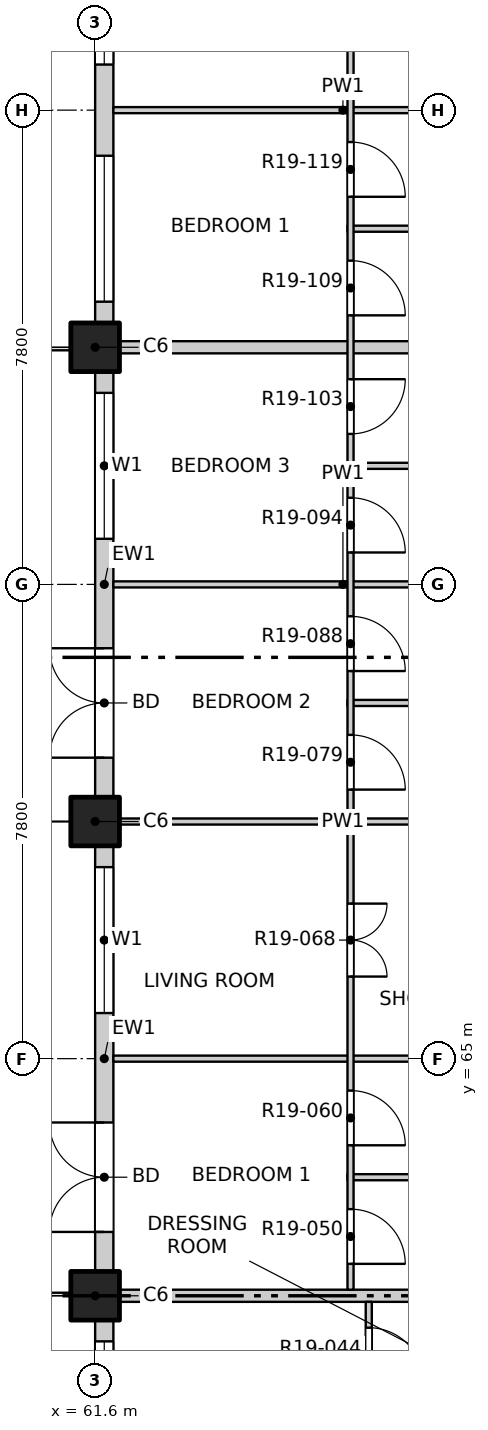
"""IFC4 building model, lengths in metres.
Left out: names, types, materials, properties, quantities, classifications, styles, units other than length and angle.
Written with IfcOpenShell. Run it as: python <this file> out.ifc"""

import sys

from ifc_helpers import new_model, si_unit, direction, frame, frame_2d, origin, origin_2d, place, context, subcontext, project, spatial, rectangle, extrude, element, fill, save


model = new_model("IFC4")
c1 = context("Model", 3, precision=1e-05, world=origin(), true_north=direction((0.0, 1.0)))
c2 = subcontext(c1, "Body", "Model", "MODEL_VIEW")
j1 = project(units=[si_unit("LENGTHUNIT", "METRE"), si_unit("PLANEANGLEUNIT", "RADIAN")], contexts=[c1])
p1 = place(None, origin())
s1 = spatial("IfcSite", under=j1, at=p1, CompositionType="ELEMENT")
p2 = place(p1, origin())
s2 = spatial("IfcBuilding", under=s1, at=p2, CompositionType="ELEMENT")
p3 = place(p2, frame((0.0, 0.0, 197.3)))
s3 = spatial("IfcBuildingStorey", under=s2, at=p3, CompositionType="ELEMENT", Elevation=197.3)
for number, where, z_axis, x_axis in (
    (1, (61.6, 61.1, -0.3), (0.0, 0.0, 1.0), (1.0, 0.0, 0.0)),
    (2, (61.6, 68.9, -0.3), (0.0, 0.0, 1.0), (1.0, 0.0, 0.0)),
    (3, (61.6, 76.7, -0.3), (0.0, 0.0, 1.0), (1.0, 0.0, 0.0)),
):
    element("IfcColumn", number, at=place(p3, frame(where, z_axis=z_axis, x_axis=x_axis)), inside=s3, PredefinedType="COLUMN", context=c2, shape_type="SweptSolid", body=[
        extrude(rectangle(XDim=0.8, YDim=0.8, at=origin_2d()), origin(), (0.0, 0.0, 1.0), 3.45),
    ])
p4 = place(p3, frame((61.75, 53.7, 0.0), z_axis=(0.0, 0.0, 1.0), x_axis=(0.0, 1.0, 0.0)))
e4 = element("IfcWall", 4, at=p4, inside=s3, PredefinedType="SOLIDWALL", context=c2, shape_type="SweptSolid", body=[
    extrude(rectangle(XDim=7.0, YDim=0.3, at=frame_2d((3.5, 0.0))), origin(), (0.0, 0.0, 1.0), 2.7),
])
p5 = place(p4, frame((0.35, 0.0, 0.9)))
e5 = element("IfcOpeningElement", 5, at=p5, cuts=e4, PredefinedType="OPENING", context=c2, shape_type="SweptSolid", body=[
    extrude(rectangle(XDim=2.4, YDim=1.8, at=frame_2d((1.2, 0.9))), frame((0.0, 0.16, 0.0), z_axis=(0.0, -1.0, 0.0), x_axis=(1.0, 0.0, 0.0)), (0.0, 0.0, 1.0), 0.32),
])
p6 = place(p4, frame((4.25, 0.0, 0.9)))
e6 = element("IfcOpeningElement", 6, at=p6, cuts=e4, PredefinedType="OPENING", context=c2, shape_type="SweptSolid", body=[
    extrude(rectangle(XDim=2.4, YDim=1.8, at=frame_2d((1.2, 0.9))), frame((0.0, 0.16, 0.0), z_axis=(0.0, -1.0, 0.0), x_axis=(1.0, 0.0, 0.0)), (0.0, 0.0, 1.0), 0.32),
])
p7 = place(p3, frame((61.75, 61.5, 0.0), z_axis=(0.0, 0.0, 1.0), x_axis=(0.0, 1.0, 0.0)))
e7 = element("IfcWall", 7, at=p7, inside=s3, PredefinedType="SOLIDWALL", context=c2, shape_type="SweptSolid", body=[
    extrude(rectangle(XDim=7.0, YDim=0.3, at=frame_2d((3.5, 0.0))), origin(), (0.0, 0.0, 1.0), 2.7),
])
p8 = place(p7, frame((0.65, 0.0, 0.0)))
e8 = element("IfcOpeningElement", 8, at=p8, cuts=e7, PredefinedType="OPENING", context=c2, shape_type="SweptSolid", body=[
    extrude(rectangle(XDim=1.8, YDim=2.4, at=frame_2d((0.9, 1.2))), frame((0.0, 0.16, 0.0), z_axis=(0.0, -1.0, 0.0), x_axis=(1.0, 0.0, 0.0)), (0.0, 0.0, 1.0), 0.32),
])
p9 = place(p7, frame((4.25, 0.0, 0.9)))
e9 = element("IfcOpeningElement", 9, at=p9, cuts=e7, PredefinedType="OPENING", context=c2, shape_type="SweptSolid", body=[
    extrude(rectangle(XDim=2.4, YDim=1.8, at=frame_2d((1.2, 0.9))), frame((0.0, 0.16, 0.0), z_axis=(0.0, -1.0, 0.0), x_axis=(1.0, 0.0, 0.0)), (0.0, 0.0, 1.0), 0.32),
])
p10 = place(p3, frame((61.75, 69.3, 0.0), z_axis=(0.0, 0.0, 1.0), x_axis=(0.0, 1.0, 0.0)))
e10 = element("IfcWall", 10, at=p10, inside=s3, PredefinedType="SOLIDWALL", context=c2, shape_type="SweptSolid", body=[
    extrude(rectangle(XDim=7.0, YDim=0.3, at=frame_2d((3.5, 0.0))), origin(), (0.0, 0.0, 1.0), 2.7),
])
p11 = place(p10, frame((0.65, 0.0, 0.0)))
e11 = element("IfcOpeningElement", 11, at=p11, cuts=e10, PredefinedType="OPENING", context=c2, shape_type="SweptSolid", body=[
    extrude(rectangle(XDim=1.8, YDim=2.4, at=frame_2d((0.9, 1.2))), frame((0.0, 0.16, 0.0), z_axis=(0.0, -1.0, 0.0), x_axis=(1.0, 0.0, 0.0)), (0.0, 0.0, 1.0), 0.32),
])
p12 = place(p10, frame((4.25, 0.0, 0.9)))
e12 = element("IfcOpeningElement", 12, at=p12, cuts=e10, PredefinedType="OPENING", context=c2, shape_type="SweptSolid", body=[
    extrude(rectangle(XDim=2.4, YDim=1.8, at=frame_2d((1.2, 0.9))), frame((0.0, 0.16, 0.0), z_axis=(0.0, -1.0, 0.0), x_axis=(1.0, 0.0, 0.0)), (0.0, 0.0, 1.0), 0.32),
])
p13 = place(p3, frame((61.75, 77.1, 0.0), z_axis=(0.0, 0.0, 1.0), x_axis=(0.0, 1.0, 0.0)))
e13 = element("IfcWall", 13, at=p13, inside=s3, PredefinedType="SOLIDWALL", context=c2, shape_type="SweptSolid", body=[
    extrude(rectangle(XDim=7.4, YDim=0.3, at=frame_2d((3.7, 0.0))), origin(), (0.0, 0.0, 1.0), 2.7),
])
p14 = place(p13, frame((0.35, 0.0, 0.9)))
e14 = element("IfcOpeningElement", 14, at=p14, cuts=e13, PredefinedType="OPENING", context=c2, shape_type="SweptSolid", body=[
    extrude(rectangle(XDim=2.4, YDim=1.8, at=frame_2d((1.2, 0.9))), frame((0.0, 0.16, 0.0), z_axis=(0.0, -1.0, 0.0), x_axis=(1.0, 0.0, 0.0)), (0.0, 0.0, 1.0), 0.32),
])
p15 = place(p13, frame((4.25, 0.0, 0.9)))
e15 = element("IfcOpeningElement", 15, at=p15, cuts=e13, PredefinedType="OPENING", context=c2, shape_type="SweptSolid", body=[
    extrude(rectangle(XDim=2.4, YDim=1.8, at=frame_2d((1.2, 0.9))), frame((0.0, 0.16, 0.0), z_axis=(0.0, -1.0, 0.0), x_axis=(1.0, 0.0, 0.0)), (0.0, 0.0, 1.0), 0.32),
])
p16 = place(p3, frame((61.9, 61.1, 0.0), z_axis=(0.0, 0.0, 1.0), x_axis=(1.0, 0.0, 0.0)))
e16 = element("IfcWall", 16, at=p16, inside=s3, PredefinedType="PARTITIONING", context=c2, shape_type="SweptSolid", body=[
    extrude(rectangle(XDim=11.5, YDim=0.2, at=frame_2d((5.75, 0.0))), origin(), (0.0, 0.0, 1.0), 2.55),
])
p17 = place(p3, frame((65.75, 63.05, 0.0), z_axis=(0.0, 0.0, 1.0), x_axis=(1.0, 0.0, 0.0)))
e17 = element("IfcWall", 17, at=p17, inside=s3, PredefinedType="PARTITIONING", context=c2, shape_type="SweptSolid", body=[
    extrude(rectangle(XDim=3.7, YDim=0.1, at=frame_2d((1.85, 0.0))), origin(), (0.0, 0.0, 1.0), 3.15),
])
p18 = place(p3, frame((61.9, 65.0, 0.0), z_axis=(0.0, 0.0, 1.0), x_axis=(1.0, 0.0, 0.0)))
e18 = element("IfcWall", 18, at=p18, inside=s3, PredefinedType="PARTITIONING", context=c2, shape_type="SweptSolid", body=[
    extrude(rectangle(XDim=7.55, YDim=0.1, at=frame_2d((3.775, 0.0))), origin(), (0.0, 0.0, 1.0), 3.15),
])
p19 = place(p3, frame((61.9, 68.9, 0.0), z_axis=(0.0, 0.0, 1.0), x_axis=(1.0, 0.0, 0.0)))
e19 = element("IfcWall", 19, at=p19, inside=s3, PredefinedType="PARTITIONING", context=c2, shape_type="SweptSolid", body=[
    extrude(rectangle(XDim=7.55, YDim=0.1, at=frame_2d((3.775, 0.0))), origin(), (0.0, 0.0, 1.0), 2.55),
])
p20 = place(p3, frame((65.75, 70.85, 0.0), z_axis=(0.0, 0.0, 1.0), x_axis=(1.0, 0.0, 0.0)))
e20 = element("IfcWall", 20, at=p20, inside=s3, PredefinedType="PARTITIONING", context=c2, shape_type="SweptSolid", body=[
    extrude(rectangle(XDim=3.7, YDim=0.1, at=frame_2d((1.85, 0.0))), origin(), (0.0, 0.0, 1.0), 3.15),
])
p21 = place(p3, frame((61.9, 72.8, 0.0), z_axis=(0.0, 0.0, 1.0), x_axis=(1.0, 0.0, 0.0)))
e21 = element("IfcWall", 21, at=p21, inside=s3, PredefinedType="PARTITIONING", context=c2, shape_type="SweptSolid", body=[
    extrude(rectangle(XDim=7.55, YDim=0.1, at=frame_2d((3.775, 0.0))), origin(), (0.0, 0.0, 1.0), 3.15),
])
p22 = place(p3, frame((65.75, 74.75, 0.0), z_axis=(0.0, 0.0, 1.0), x_axis=(1.0, 0.0, 0.0)))
e22 = element("IfcWall", 22, at=p22, inside=s3, PredefinedType="PARTITIONING", context=c2, shape_type="SweptSolid", body=[
    extrude(rectangle(XDim=3.7, YDim=0.1, at=frame_2d((1.85, 0.0))), origin(), (0.0, 0.0, 1.0), 3.15),
])
p23 = place(p3, frame((61.9, 76.7, 0.0), z_axis=(0.0, 0.0, 1.0), x_axis=(1.0, 0.0, 0.0)))
e23 = element("IfcWall", 23, at=p23, inside=s3, PredefinedType="PARTITIONING", context=c2, shape_type="SweptSolid", body=[
    extrude(rectangle(XDim=11.5, YDim=0.2, at=frame_2d((5.75, 0.0))), origin(), (0.0, 0.0, 1.0), 2.55),
])
p24 = place(p3, frame((65.75, 78.65, 0.0), z_axis=(0.0, 0.0, 1.0), x_axis=(1.0, 0.0, 0.0)))
e24 = element("IfcWall", 24, at=p24, inside=s3, PredefinedType="PARTITIONING", context=c2, shape_type="SweptSolid", body=[
    extrude(rectangle(XDim=3.7, YDim=0.1, at=frame_2d((1.85, 0.0))), origin(), (0.0, 0.0, 1.0), 3.15),
])
p25 = place(p3, frame((61.9, 80.6, 0.0), z_axis=(0.0, 0.0, 1.0), x_axis=(1.0, 0.0, 0.0)))
e25 = element("IfcWall", 25, at=p25, inside=s3, PredefinedType="PARTITIONING", context=c2, shape_type="SweptSolid", body=[
    extrude(rectangle(XDim=7.55, YDim=0.1, at=frame_2d((3.775, 0.0))), origin(), (0.0, 0.0, 1.0), 3.15),
])
p26 = place(p3, frame((65.8, 61.2, 0.0), z_axis=(0.0, 0.0, 1.0), x_axis=(0.0, 1.0, 0.0)))
e26 = element("IfcWall", 26, at=p26, inside=s3, PredefinedType="PARTITIONING", context=c2, shape_type="SweptSolid", body=[
    extrude(rectangle(XDim=26.9, YDim=0.1, at=frame_2d((13.45, 0.0))), origin(), (0.0, 0.0, 1.0), 3.15),
])
p27 = place(p26, frame((0.425, 0.0, 0.0)))
e27 = element("IfcOpeningElement", 27, at=p27, cuts=e26, PredefinedType="OPENING", context=c2, shape_type="SweptSolid", body=[
    extrude(rectangle(XDim=0.9, YDim=2.1, at=frame_2d((0.45, 1.05))), frame((0.0, 0.06, 0.0), z_axis=(0.0, -1.0, 0.0), x_axis=(1.0, 0.0, 0.0)), (0.0, 0.0, 1.0), 0.12),
])
p28 = place(p26, frame((2.375, 0.0, 0.0)))
e28 = element("IfcOpeningElement", 28, at=p28, cuts=e26, PredefinedType="OPENING", context=c2, shape_type="SweptSolid", body=[
    extrude(rectangle(XDim=0.9, YDim=2.1, at=frame_2d((0.45, 1.05))), frame((0.0, 0.06, 0.0), z_axis=(0.0, -1.0, 0.0), x_axis=(1.0, 0.0, 0.0)), (0.0, 0.0, 1.0), 0.12),
])
p29 = place(p26, frame((5.15, 0.0, 0.0)))
e29 = element("IfcOpeningElement", 29, at=p29, cuts=e26, PredefinedType="OPENING", context=c2, shape_type="SweptSolid", body=[
    extrude(rectangle(XDim=1.2, YDim=2.1, at=frame_2d((0.6, 1.05))), frame((0.0, 0.06, 0.0), z_axis=(0.0, -1.0, 0.0), x_axis=(1.0, 0.0, 0.0)), (0.0, 0.0, 1.0), 0.12),
])
p30 = place(p26, frame((8.225, 0.0, 0.0)))
e30 = element("IfcOpeningElement", 30, at=p30, cuts=e26, PredefinedType="OPENING", context=c2, shape_type="SweptSolid", body=[
    extrude(rectangle(XDim=0.9, YDim=2.1, at=frame_2d((0.45, 1.05))), frame((0.0, 0.06, 0.0), z_axis=(0.0, -1.0, 0.0), x_axis=(1.0, 0.0, 0.0)), (0.0, 0.0, 1.0), 0.12),
])
p31 = place(p26, frame((10.175, 0.0, 0.0)))
e31 = element("IfcOpeningElement", 31, at=p31, cuts=e26, PredefinedType="OPENING", context=c2, shape_type="SweptSolid", body=[
    extrude(rectangle(XDim=0.9, YDim=2.1, at=frame_2d((0.45, 1.05))), frame((0.0, 0.06, 0.0), z_axis=(0.0, -1.0, 0.0), x_axis=(1.0, 0.0, 0.0)), (0.0, 0.0, 1.0), 0.12),
])
p32 = place(p26, frame((12.125, 0.0, 0.0)))
e32 = element("IfcOpeningElement", 32, at=p32, cuts=e26, PredefinedType="OPENING", context=c2, shape_type="SweptSolid", body=[
    extrude(rectangle(XDim=0.9, YDim=2.1, at=frame_2d((0.45, 1.05))), frame((0.0, 0.06, 0.0), z_axis=(0.0, -1.0, 0.0), x_axis=(1.0, 0.0, 0.0)), (0.0, 0.0, 1.0), 0.12),
])
p33 = place(p26, frame((14.075, 0.0, 0.0)))
e33 = element("IfcOpeningElement", 33, at=p33, cuts=e26, PredefinedType="OPENING", context=c2, shape_type="SweptSolid", body=[
    extrude(rectangle(XDim=0.9, YDim=2.1, at=frame_2d((0.45, 1.05))), frame((0.0, 0.06, 0.0), z_axis=(0.0, -1.0, 0.0), x_axis=(1.0, 0.0, 0.0)), (0.0, 0.0, 1.0), 0.12),
])
p34 = place(p26, frame((16.025, 0.0, 0.0)))
e34 = element("IfcOpeningElement", 34, at=p34, cuts=e26, PredefinedType="OPENING", context=c2, shape_type="SweptSolid", body=[
    extrude(rectangle(XDim=0.9, YDim=2.1, at=frame_2d((0.45, 1.05))), frame((0.0, 0.06, 0.0), z_axis=(0.0, -1.0, 0.0), x_axis=(1.0, 0.0, 0.0)), (0.0, 0.0, 1.0), 0.12),
])
p35 = place(p26, frame((17.975, 0.0, 0.0)))
e35 = element("IfcOpeningElement", 35, at=p35, cuts=e26, PredefinedType="OPENING", context=c2, shape_type="SweptSolid", body=[
    extrude(rectangle(XDim=0.9, YDim=2.1, at=frame_2d((0.45, 1.05))), frame((0.0, 0.06, 0.0), z_axis=(0.0, -1.0, 0.0), x_axis=(1.0, 0.0, 0.0)), (0.0, 0.0, 1.0), 0.12),
])
p36 = place(p26, frame((20.75, 0.0, 0.0)))
e36 = element("IfcOpeningElement", 36, at=p36, cuts=e26, PredefinedType="OPENING", context=c2, shape_type="SweptSolid", body=[
    extrude(rectangle(XDim=1.2, YDim=2.1, at=frame_2d((0.6, 1.05))), frame((0.0, 0.06, 0.0), z_axis=(0.0, -1.0, 0.0), x_axis=(1.0, 0.0, 0.0)), (0.0, 0.0, 1.0), 0.12),
])
p37 = place(p26, frame((24.65, 0.0, 0.0)))
e37 = element("IfcOpeningElement", 37, at=p37, cuts=e26, PredefinedType="OPENING", context=c2, shape_type="SweptSolid", body=[
    extrude(rectangle(XDim=1.2, YDim=2.1, at=frame_2d((0.6, 1.05))), frame((0.0, 0.06, 0.0), z_axis=(0.0, -1.0, 0.0), x_axis=(1.0, 0.0, 0.0)), (0.0, 0.0, 1.0), 0.12),
])
p38 = place(p3, frame((66.1, 41.9, 0.0), z_axis=(0.0, 0.0, 1.0), x_axis=(0.0, 1.0, 0.0)))
e38 = element("IfcWall", 38, at=p38, inside=s3, PredefinedType="PARTITIONING", context=c2, shape_type="SweptSolid", body=[
    extrude(rectangle(XDim=19.1, YDim=0.1, at=frame_2d((9.55, 0.0))), origin(), (0.0, 0.0, 1.0), 3.15),
])
p39 = place(p38, frame((1.05, 0.0, 0.0)))
e39 = element("IfcOpeningElement", 39, at=p39, cuts=e38, PredefinedType="OPENING", context=c2, shape_type="SweptSolid", body=[
    extrude(rectangle(XDim=1.2, YDim=2.1, at=frame_2d((0.6, 1.05))), frame((0.0, 0.06, 0.0), z_axis=(0.0, -1.0, 0.0), x_axis=(1.0, 0.0, 0.0)), (0.0, 0.0, 1.0), 0.12),
])
p40 = place(p38, frame((4.95, 0.0, 0.0)))
e40 = element("IfcOpeningElement", 40, at=p40, cuts=e38, PredefinedType="OPENING", context=c2, shape_type="SweptSolid", body=[
    extrude(rectangle(XDim=1.2, YDim=2.1, at=frame_2d((0.6, 1.05))), frame((0.0, 0.06, 0.0), z_axis=(0.0, -1.0, 0.0), x_axis=(1.0, 0.0, 0.0)), (0.0, 0.0, 1.0), 0.12),
])
p41 = place(p38, frame((8.85, 0.0, 0.0)))
e41 = element("IfcOpeningElement", 41, at=p41, cuts=e38, PredefinedType="OPENING", context=c2, shape_type="SweptSolid", body=[
    extrude(rectangle(XDim=1.2, YDim=2.1, at=frame_2d((0.6, 1.05))), frame((0.0, 0.06, 0.0), z_axis=(0.0, -1.0, 0.0), x_axis=(1.0, 0.0, 0.0)), (0.0, 0.0, 1.0), 0.12),
])
p42 = place(p38, frame((11.925, 0.0, 0.0)))
e42 = element("IfcOpeningElement", 42, at=p42, cuts=e38, PredefinedType="OPENING", context=c2, shape_type="SweptSolid", body=[
    extrude(rectangle(XDim=0.9, YDim=2.1, at=frame_2d((0.45, 1.05))), frame((0.0, 0.06, 0.0), z_axis=(0.0, -1.0, 0.0), x_axis=(1.0, 0.0, 0.0)), (0.0, 0.0, 1.0), 0.12),
])
p43 = place(p38, frame((13.875, 0.0, 0.0)))
e43 = element("IfcOpeningElement", 43, at=p43, cuts=e38, PredefinedType="OPENING", context=c2, shape_type="SweptSolid", body=[
    extrude(rectangle(XDim=0.9, YDim=2.1, at=frame_2d((0.45, 1.05))), frame((0.0, 0.06, 0.0), z_axis=(0.0, -1.0, 0.0), x_axis=(1.0, 0.0, 0.0)), (0.0, 0.0, 1.0), 0.12),
])
p44 = place(p38, frame((15.825, 0.0, 0.0)))
e44 = element("IfcOpeningElement", 44, at=p44, cuts=e38, PredefinedType="OPENING", context=c2, shape_type="SweptSolid", body=[
    extrude(rectangle(XDim=0.9, YDim=2.1, at=frame_2d((0.45, 1.05))), frame((0.0, 0.06, 0.0), z_axis=(0.0, -1.0, 0.0), x_axis=(1.0, 0.0, 0.0)), (0.0, 0.0, 1.0), 0.12),
])
p45 = place(p38, frame((17.775, 0.0, 0.0)))
e45 = element("IfcOpeningElement", 45, at=p45, cuts=e38, PredefinedType="OPENING", context=c2, shape_type="SweptSolid", body=[
    extrude(rectangle(XDim=0.9, YDim=2.1, at=frame_2d((0.45, 1.05))), frame((0.0, 0.06, 0.0), z_axis=(0.0, -1.0, 0.0), x_axis=(1.0, 0.0, 0.0)), (0.0, 0.0, 1.0), 0.12),
])
p46 = place(p6, origin())
e46 = element("IfcWindow", 46, at=p46, inside=s3, PartitioningType="DOUBLE_PANEL_VERTICAL", PredefinedType="WINDOW", context=c2, shape_type="SweptSolid", body=[
    extrude(rectangle(XDim=2.4, YDim=1.8, at=frame_2d((1.2, 0.9))), frame((0.0, 0.03, 0.0), z_axis=(0.0, -1.0, 0.0), x_axis=(1.0, 0.0, 0.0)), (0.0, 0.0, 1.0), 0.06),
])
fill(e6, e46)
p47 = place(p8, origin())
e47 = element("IfcDoor", 47, at=p47, inside=s3, OperationType="DOUBLE_DOOR_SINGLE_SWING", PredefinedType="DOOR", context=c2, shape_type="SweptSolid", body=[
    extrude(rectangle(XDim=1.8, YDim=2.4, at=frame_2d((0.9, 1.2))), frame((0.0, 0.025, 0.0), z_axis=(0.0, -1.0, 0.0), x_axis=(1.0, 0.0, 0.0)), (0.0, 0.0, 1.0), 0.05),
])
fill(e8, e47)
p48 = place(p9, origin())
e48 = element("IfcWindow", 48, at=p48, inside=s3, PartitioningType="DOUBLE_PANEL_VERTICAL", PredefinedType="WINDOW", context=c2, shape_type="SweptSolid", body=[
    extrude(rectangle(XDim=2.4, YDim=1.8, at=frame_2d((1.2, 0.9))), frame((0.0, 0.03, 0.0), z_axis=(0.0, -1.0, 0.0), x_axis=(1.0, 0.0, 0.0)), (0.0, 0.0, 1.0), 0.06),
])
fill(e9, e48)
p49 = place(p11, origin())
e49 = element("IfcDoor", 49, at=p49, inside=s3, OperationType="DOUBLE_DOOR_SINGLE_SWING", PredefinedType="DOOR", context=c2, shape_type="SweptSolid", body=[
    extrude(rectangle(XDim=1.8, YDim=2.4, at=frame_2d((0.9, 1.2))), frame((0.0, 0.025, 0.0), z_axis=(0.0, -1.0, 0.0), x_axis=(1.0, 0.0, 0.0)), (0.0, 0.0, 1.0), 0.05),
])
fill(e11, e49)
p50 = place(p12, origin())
e50 = element("IfcWindow", 50, at=p50, inside=s3, PartitioningType="DOUBLE_PANEL_VERTICAL", PredefinedType="WINDOW", context=c2, shape_type="SweptSolid", body=[
    extrude(rectangle(XDim=2.4, YDim=1.8, at=frame_2d((1.2, 0.9))), frame((0.0, 0.03, 0.0), z_axis=(0.0, -1.0, 0.0), x_axis=(1.0, 0.0, 0.0)), (0.0, 0.0, 1.0), 0.06),
])
fill(e12, e50)
p51 = place(p14, origin())
e51 = element("IfcWindow", 51, at=p51, inside=s3, PartitioningType="DOUBLE_PANEL_VERTICAL", PredefinedType="WINDOW", context=c2, shape_type="SweptSolid", body=[
    extrude(rectangle(XDim=2.4, YDim=1.8, at=frame_2d((1.2, 0.9))), frame((0.0, 0.03, 0.0), z_axis=(0.0, -1.0, 0.0), x_axis=(1.0, 0.0, 0.0)), (0.0, 0.0, 1.0), 0.06),
])
fill(e14, e51)
p52 = place(p15, origin())
e52 = element("IfcWindow", 52, at=p52, inside=s3, PartitioningType="DOUBLE_PANEL_VERTICAL", PredefinedType="WINDOW", context=c2, shape_type="SweptSolid", body=[
    extrude(rectangle(XDim=2.4, YDim=1.8, at=frame_2d((1.2, 0.9))), frame((0.0, 0.03, 0.0), z_axis=(0.0, -1.0, 0.0), x_axis=(1.0, 0.0, 0.0)), (0.0, 0.0, 1.0), 0.06),
])
fill(e15, e52)
p53 = place(p45, origin())
e53 = element("IfcDoor", 53, at=p53, inside=s3, OperationType="SINGLE_SWING_RIGHT", PredefinedType="DOOR", context=c2, shape_type="SweptSolid", body=[
    extrude(rectangle(XDim=0.9, YDim=2.1, at=frame_2d((0.45, 1.05))), frame((0.0, 0.025, 0.0), z_axis=(0.0, -1.0, 0.0), x_axis=(1.0, 0.0, 0.0)), (0.0, 0.0, 1.0), 0.05),
])
fill(e45, e53)
p54 = place(p27, origin())
e54 = element("IfcDoor", 54, at=p54, inside=s3, OperationType="SINGLE_SWING_RIGHT", PredefinedType="DOOR", context=c2, shape_type="SweptSolid", body=[
    extrude(rectangle(XDim=0.9, YDim=2.1, at=frame_2d((0.45, 1.05))), frame((0.0, 0.025, 0.0), z_axis=(0.0, -1.0, 0.0), x_axis=(1.0, 0.0, 0.0)), (0.0, 0.0, 1.0), 0.05),
])
fill(e27, e54)
p55 = place(p28, origin())
e55 = element("IfcDoor", 55, at=p55, inside=s3, OperationType="SINGLE_SWING_RIGHT", PredefinedType="DOOR", context=c2, shape_type="SweptSolid", body=[
    extrude(rectangle(XDim=0.9, YDim=2.1, at=frame_2d((0.45, 1.05))), frame((0.0, 0.025, 0.0), z_axis=(0.0, -1.0, 0.0), x_axis=(1.0, 0.0, 0.0)), (0.0, 0.0, 1.0), 0.05),
])
fill(e28, e55)
p56 = place(p29, origin())
e56 = element("IfcDoor", 56, at=p56, inside=s3, OperationType="DOUBLE_DOOR_SINGLE_SWING", PredefinedType="DOOR", context=c2, shape_type="SweptSolid", body=[
    extrude(rectangle(XDim=1.2, YDim=2.1, at=frame_2d((0.6, 1.05))), frame((0.0, 0.025, 0.0), z_axis=(0.0, -1.0, 0.0), x_axis=(1.0, 0.0, 0.0)), (0.0, 0.0, 1.0), 0.05),
])
fill(e29, e56)
p57 = place(p30, origin())
e57 = element("IfcDoor", 57, at=p57, inside=s3, OperationType="SINGLE_SWING_RIGHT", PredefinedType="DOOR", context=c2, shape_type="SweptSolid", body=[
    extrude(rectangle(XDim=0.9, YDim=2.1, at=frame_2d((0.45, 1.05))), frame((0.0, 0.025, 0.0), z_axis=(0.0, -1.0, 0.0), x_axis=(1.0, 0.0, 0.0)), (0.0, 0.0, 1.0), 0.05),
])
fill(e30, e57)
p58 = place(p31, origin())
e58 = element("IfcDoor", 58, at=p58, inside=s3, OperationType="SINGLE_SWING_RIGHT", PredefinedType="DOOR", context=c2, shape_type="SweptSolid", body=[
    extrude(rectangle(XDim=0.9, YDim=2.1, at=frame_2d((0.45, 1.05))), frame((0.0, 0.025, 0.0), z_axis=(0.0, -1.0, 0.0), x_axis=(1.0, 0.0, 0.0)), (0.0, 0.0, 1.0), 0.05),
])
fill(e31, e58)
p59 = place(p32, origin())
e59 = element("IfcDoor", 59, at=p59, inside=s3, OperationType="SINGLE_SWING_RIGHT", PredefinedType="DOOR", context=c2, shape_type="SweptSolid", body=[
    extrude(rectangle(XDim=0.9, YDim=2.1, at=frame_2d((0.45, 1.05))), frame((0.0, 0.025, 0.0), z_axis=(0.0, -1.0, 0.0), x_axis=(1.0, 0.0, 0.0)), (0.0, 0.0, 1.0), 0.05),
])
fill(e32, e59)
p60 = place(p33, origin())
e60 = element("IfcDoor", 60, at=p60, inside=s3, OperationType="SINGLE_SWING_LEFT", PredefinedType="DOOR", context=c2, shape_type="SweptSolid", body=[
    extrude(rectangle(XDim=0.9, YDim=2.1, at=frame_2d((0.45, 1.05))), frame((0.0, 0.025, 0.0), z_axis=(0.0, -1.0, 0.0), x_axis=(1.0, 0.0, 0.0)), (0.0, 0.0, 1.0), 0.05),
])
fill(e33, e60)
p61 = place(p34, origin())
e61 = element("IfcDoor", 61, at=p61, inside=s3, OperationType="SINGLE_SWING_RIGHT", PredefinedType="DOOR", context=c2, shape_type="SweptSolid", body=[
    extrude(rectangle(XDim=0.9, YDim=2.1, at=frame_2d((0.45, 1.05))), frame((0.0, 0.025, 0.0), z_axis=(0.0, -1.0, 0.0), x_axis=(1.0, 0.0, 0.0)), (0.0, 0.0, 1.0), 0.05),
])
fill(e34, e61)
p62 = place(p35, origin())
e62 = element("IfcDoor", 62, at=p62, inside=s3, OperationType="SINGLE_SWING_RIGHT", PredefinedType="DOOR", context=c2, shape_type="SweptSolid", body=[
    extrude(rectangle(XDim=0.9, YDim=2.1, at=frame_2d((0.45, 1.05))), frame((0.0, 0.025, 0.0), z_axis=(0.0, -1.0, 0.0), x_axis=(1.0, 0.0, 0.0)), (0.0, 0.0, 1.0), 0.05),
])
fill(e35, e62)
save(model, sys.argv[1])
